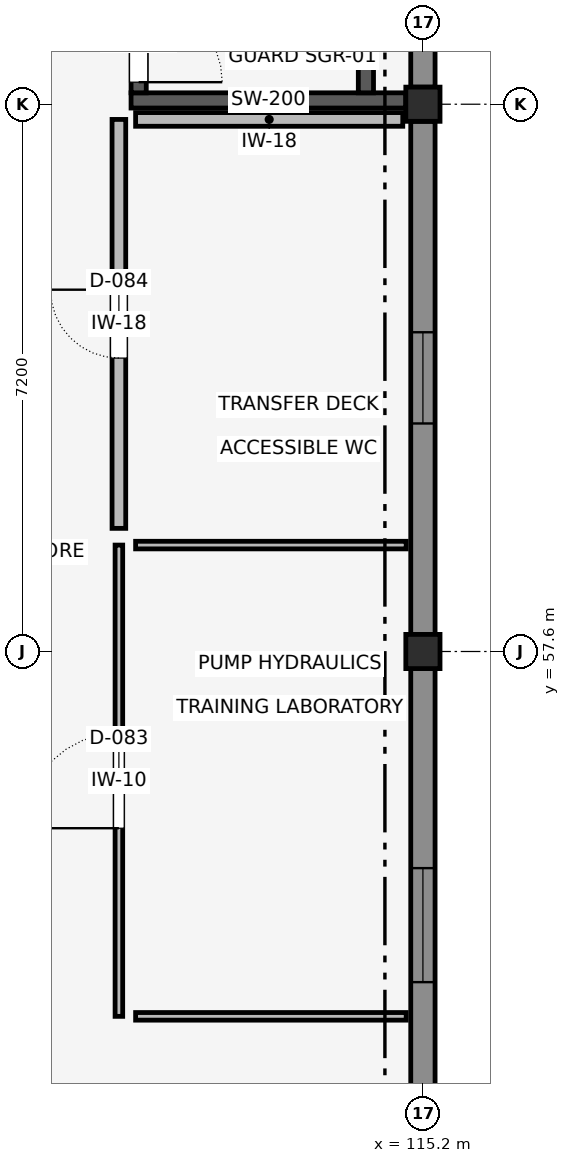
"""IFC4 building model, lengths in metres.
Left out: names, types, materials, properties, quantities, classifications, styles, units other than length and angle.
Written with IfcOpenShell. Run it as: python <this file> out.ifc"""

import sys

from ifc_helpers import new_model, si_unit, direction, frame, frame_2d, origin, origin_2d, place, context, subcontext, project, spatial, rectangle, extrude, element, fill, save


model = new_model("IFC4")
c1 = context("Model", 3, precision=1e-05, world=origin(), true_north=direction((0.0, 1.0)))
c2 = subcontext(c1, "Body", "Model", "MODEL_VIEW")
j1 = project(units=[si_unit("LENGTHUNIT", "METRE"), si_unit("PLANEANGLEUNIT", "RADIAN")], contexts=[c1])
p1 = place(None, origin())
s1 = spatial("IfcSite", under=j1, at=p1, CompositionType="ELEMENT")
p2 = place(p1, origin())
s2 = spatial("IfcBuilding", under=s1, at=p2, CompositionType="ELEMENT")
p3 = place(p2, frame((0.0, 0.0, 5.4)))
s3 = spatial("IfcBuildingStorey", under=s2, at=p3, CompositionType="ELEMENT", Elevation=5.4)
for number, where, z_axis, x_axis in (
    (1, (115.2, 57.6, 0.0), (0.0, 0.0, 1.0), (1.0, 0.0, 0.0)),
    (2, (115.2, 64.8, 0.0), (0.0, 0.0, 1.0), (1.0, 0.0, 0.0)),
):
    element("IfcColumn", number, at=place(p3, frame(where, z_axis=z_axis, x_axis=x_axis)), inside=s3, PredefinedType="COLUMN", context=c2, shape_type="SweptSolid", body=[
        extrude(rectangle(XDim=0.45, YDim=0.45, at=origin_2d()), origin(), (0.0, 0.0, 1.0), 4.2),
    ])
p4 = place(p3, frame((111.36, 64.85, 0.0), z_axis=(0.0, 0.0, 1.0), x_axis=(1.0, 0.0, 0.0)))
e3 = element("IfcWall", 3, at=p4, inside=s3, PredefinedType="SHEAR", context=c2, shape_type="SweptSolid", body=[
    extrude(rectangle(XDim=3.615, YDim=0.2, at=frame_2d((1.808, 0.0))), origin(), (0.0, 0.0, 1.0), 3.95),
])
p5 = place(p3, frame((111.46, 64.95, 0.0), z_axis=(0.0, 0.0, 1.0), x_axis=(0.0, 1.0, 0.0)))
e4 = element("IfcWall", 4, at=p5, inside=s3, PredefinedType="SHEAR", context=c2, shape_type="SweptSolid", body=[
    extrude(rectangle(XDim=6.56, YDim=0.2, at=frame_2d((3.28, 0.0))), origin(), (0.0, 0.0, 1.0), 3.95),
])
p6 = place(p5, frame((0.14, 0.0, 0.0)))
e5 = element("IfcOpeningElement", 5, at=p6, cuts=e4, PredefinedType="OPENING", context=c2, shape_type="SweptSolid", body=[
    extrude(rectangle(XDim=1.1, YDim=2.15, at=frame_2d((0.55, 1.075))), frame((0.0, 0.112, 0.0), z_axis=(0.0, -1.0, 0.0), x_axis=(1.0, 0.0, 0.0)), (0.0, 0.0, 1.0), 0.224),
])
p7 = place(p3, frame((114.45, 64.95, 0.0), z_axis=(0.0, 0.0, 1.0), x_axis=(0.0, 1.0, 0.0)))
e6 = element("IfcWall", 6, at=p7, inside=s3, PredefinedType="SHEAR", context=c2, shape_type="SweptSolid", body=[
    extrude(rectangle(XDim=6.56, YDim=0.2, at=frame_2d((3.28, 0.0))), origin(), (0.0, 0.0, 1.0), 3.95),
])
p8 = place(p3, frame((115.2, 71.775, 0.0), z_axis=(0.0, 0.0, 1.0), x_axis=(0.0, -1.0, 0.0)))
e7 = element("IfcWall", 7, at=p8, inside=s3, PredefinedType="ELEMENTEDWALL", context=c2, shape_type="SweptSolid", body=[
    extrude(rectangle(XDim=6.75, YDim=0.32, at=frame_2d((3.375, 0.0))), origin(), (0.0, 0.0, 1.0), 3.773),
])
p9 = place(p8, frame((2.375, 0.0, 0.85)))
e8 = element("IfcOpeningElement", 8, at=p9, cuts=e7, PredefinedType="OPENING", context=c2, shape_type="SweptSolid", body=[
    extrude(rectangle(XDim=2.0, YDim=1.85, at=frame_2d((1.0, 0.925))), frame((0.0, 0.172, 0.0), z_axis=(0.0, -1.0, 0.0), x_axis=(1.0, 0.0, 0.0)), (0.0, 0.0, 1.0), 0.344),
])
p10 = place(p3, frame((115.2, 64.575, 0.0), z_axis=(0.0, 0.0, 1.0), x_axis=(0.0, -1.0, 0.0)))
e9 = element("IfcWall", 9, at=p10, inside=s3, PredefinedType="ELEMENTEDWALL", context=c2, shape_type="SweptSolid", body=[
    extrude(rectangle(XDim=6.75, YDim=0.32, at=frame_2d((3.375, 0.0))), origin(), (0.0, 0.0, 1.0), 3.773),
])
p11 = place(p10, frame((2.775, 0.0, 0.85)))
e10 = element("IfcOpeningElement", 10, at=p11, cuts=e9, PredefinedType="OPENING", context=c2, shape_type="SweptSolid", body=[
    extrude(rectangle(XDim=1.2, YDim=2.2, at=frame_2d((0.6, 1.1))), frame((0.0, 0.172, 0.0), z_axis=(0.0, -1.0, 0.0), x_axis=(1.0, 0.0, 0.0)), (0.0, 0.0, 1.0), 0.344),
])
p12 = place(p3, frame((115.2, 57.375, 0.0), z_axis=(0.0, 0.0, 1.0), x_axis=(0.0, -1.0, 0.0)))
e11 = element("IfcWall", 11, at=p12, inside=s3, PredefinedType="ELEMENTEDWALL", context=c2, shape_type="SweptSolid", body=[
    extrude(rectangle(XDim=6.75, YDim=0.32, at=frame_2d((3.375, 0.0))), origin(), (0.0, 0.0, 1.0), 3.773),
])
p13 = place(p12, frame((2.625, 0.0, 0.85)))
e12 = element("IfcOpeningElement", 12, at=p13, cuts=e11, PredefinedType="OPENING", context=c2, shape_type="SweptSolid", body=[
    extrude(rectangle(XDim=1.5, YDim=2.2, at=frame_2d((0.75, 1.1))), frame((0.0, 0.172, 0.0), z_axis=(0.0, -1.0, 0.0), x_axis=(1.0, 0.0, 0.0)), (0.0, 0.0, 1.0), 0.344),
])
p14 = place(p3, frame((111.2, 52.8, 0.0), z_axis=(0.0, 0.0, 1.0), x_axis=(0.0, 1.0, 0.0)))
e13 = element("IfcWall", 13, at=p14, inside=s3, PredefinedType="PARTITIONING", context=c2, shape_type="SweptSolid", body=[
    extrude(rectangle(XDim=6.2, YDim=0.1, at=frame_2d((3.1, 0.0))), origin(), (0.0, 0.0, 1.0), 3.773),
])
p15 = place(p14, frame((2.475, 0.0, 0.0)))
e14 = element("IfcOpeningElement", 14, at=p15, cuts=e13, PredefinedType="OPENING", context=c2, shape_type="SweptSolid", body=[
    extrude(rectangle(XDim=1.25, YDim=2.15, at=frame_2d((0.625, 1.075))), frame((0.0, 0.062, 0.0), z_axis=(0.0, -1.0, 0.0), x_axis=(1.0, 0.0, 0.0)), (0.0, 0.0, 1.0), 0.124),
])
for number, where, z_axis, x_axis in (
    (15, (111.42, 52.8, 0.0), (0.0, 0.0, 1.0), (1.0, 0.0, 0.0)),
    (16, (111.42, 59.0, 0.0), (0.0, 0.0, 1.0), (1.0, 0.0, 0.0)),
):
    element("IfcWall", number, at=place(p3, frame(where, z_axis=z_axis, x_axis=x_axis)), inside=s3, PredefinedType="PARTITIONING", context=c2, shape_type="SweptSolid", body=[
        extrude(rectangle(XDim=3.56, YDim=0.1, at=frame_2d((1.78, 0.0))), origin(), (0.0, 0.0, 1.0), 3.92),
    ])
p16 = place(p3, frame((111.2, 59.22, 0.0), z_axis=(0.0, 0.0, 1.0), x_axis=(0.0, 1.0, 0.0)))
e17 = element("IfcWall", 17, at=p16, inside=s3, PredefinedType="PLUMBINGWALL", context=c2, shape_type="SweptSolid", body=[
    extrude(rectangle(XDim=5.38, YDim=0.18, at=frame_2d((2.69, 0.0))), origin(), (0.0, 0.0, 1.0), 3.92),
])
p17 = place(p16, frame((2.24, 0.0, 0.0)))
e18 = element("IfcOpeningElement", 18, at=p17, cuts=e17, PredefinedType="OPENING", context=c2, shape_type="SweptSolid", body=[
    extrude(rectangle(XDim=0.9, YDim=2.1, at=frame_2d((0.45, 1.05))), frame((0.0, 0.102, 0.0), z_axis=(0.0, -1.0, 0.0), x_axis=(1.0, 0.0, 0.0)), (0.0, 0.0, 1.0), 0.204),
])
p18 = place(p3, frame((111.42, 64.6, 0.0), z_axis=(0.0, 0.0, 1.0), x_axis=(1.0, 0.0, 0.0)))
e19 = element("IfcWall", 19, at=p18, inside=s3, PredefinedType="PLUMBINGWALL", context=c2, shape_type="SweptSolid", body=[
    extrude(rectangle(XDim=3.515, YDim=0.18, at=frame_2d((1.758, 0.0))), origin(), (0.0, 0.0, 1.0), 3.92),
])
p19 = place(p11, origin())
e20 = element("IfcWindow", 20, at=p19, inside=s3, PartitioningType="SINGLE_PANEL", PredefinedType="WINDOW", context=c2, shape_type="SweptSolid", body=[
    extrude(rectangle(XDim=1.2, YDim=2.2, at=frame_2d((0.6, 1.1))), frame((0.0, 0.03, 0.0), z_axis=(0.0, -1.0, 0.0), x_axis=(1.0, 0.0, 0.0)), (0.0, 0.0, 1.0), 0.06),
])
fill(e10, e20)
p20 = place(p13, origin())
e21 = element("IfcWindow", 21, at=p20, inside=s3, PartitioningType="SINGLE_PANEL", PredefinedType="WINDOW", context=c2, shape_type="SweptSolid", body=[
    extrude(rectangle(XDim=1.5, YDim=2.2, at=frame_2d((0.75, 1.1))), frame((0.0, 0.03, 0.0), z_axis=(0.0, -1.0, 0.0), x_axis=(1.0, 0.0, 0.0)), (0.0, 0.0, 1.0), 0.06),
])
fill(e12, e21)
p21 = place(p6, frame((1.1, 0.0, 0.0), z_axis=(0.0, 0.0, 1.0), x_axis=(-1.0, 0.0, 0.0)))
e22 = element("IfcDoor", 22, at=p21, inside=s3, OperationType="SINGLE_SWING_RIGHT", PredefinedType="DOOR", context=c2, shape_type="SweptSolid", body=[
    extrude(rectangle(XDim=1.1, YDim=2.15, at=frame_2d((0.55, 1.075))), frame((0.0, 0.025, 0.0), z_axis=(0.0, -1.0, 0.0), x_axis=(1.0, 0.0, 0.0)), (0.0, 0.0, 1.0), 0.05),
])
fill(e5, e22)
p22 = place(p15, origin())
e23 = element("IfcDoor", 23, at=p22, inside=s3, OperationType="SINGLE_SWING_LEFT", PredefinedType="DOOR", context=c2, shape_type="SweptSolid", body=[
    extrude(rectangle(XDim=1.25, YDim=2.15, at=frame_2d((0.625, 1.075))), frame((0.0, 0.025, 0.0), z_axis=(0.0, -1.0, 0.0), x_axis=(1.0, 0.0, 0.0)), (0.0, 0.0, 1.0), 0.05),
])
fill(e14, e23)
p23 = place(p17, origin())
e24 = element("IfcDoor", 24, at=p23, inside=s3, OperationType="SINGLE_SWING_RIGHT", PredefinedType="DOOR", context=c2, shape_type="SweptSolid", body=[
    extrude(rectangle(XDim=0.9, YDim=2.1, at=frame_2d((0.45, 1.05))), frame((0.0, 0.025, 0.0), z_axis=(0.0, -1.0, 0.0), x_axis=(1.0, 0.0, 0.0)), (0.0, 0.0, 1.0), 0.05),
])
fill(e18, e24)
save(model, sys.argv[1])
